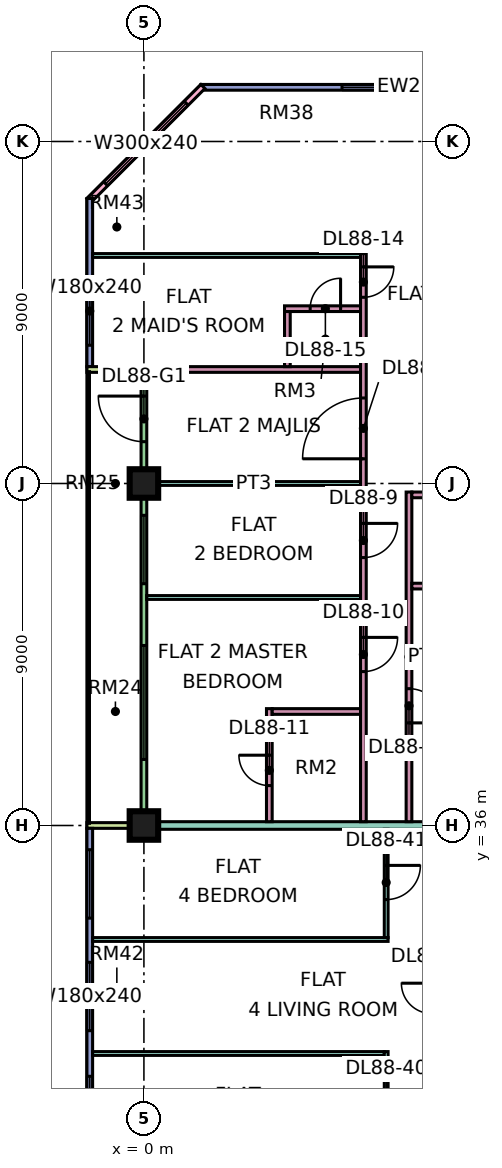
"""IFC4 building model, lengths in metres.
Left out: names, types, materials, properties, quantities, classifications, styles, units other than length and angle.
Written with IfcOpenShell. Run it as: python <this file> out.ifc"""

import sys

from ifc_helpers import new_model, si_unit, direction, frame, frame_2d, origin, origin_2d, place, context, subcontext, project, spatial, rectangle, extrude, element, fill, save


model = new_model("IFC4")
c1 = context("Model", 3, precision=1e-05, world=origin(), true_north=direction((0.0, 1.0)))
c2 = subcontext(c1, "Body", "Model", "MODEL_VIEW")
j1 = project(units=[si_unit("LENGTHUNIT", "METRE"), si_unit("PLANEANGLEUNIT", "RADIAN")], contexts=[c1])
p1 = place(None, origin())
s1 = spatial("IfcSite", under=j1, at=p1, CompositionType="ELEMENT")
p2 = place(p1, origin())
s2 = spatial("IfcBuilding", under=s1, at=p2, CompositionType="ELEMENT")
p3 = place(p2, frame((0.0, 0.0, 376.4)))
s3 = spatial("IfcBuildingStorey", under=s2, at=p3, CompositionType="ELEMENT", Elevation=376.4)
p4 = place(p3, frame((0.0, 36.0, 0.0), z_axis=(0.0, 0.0, 1.0), x_axis=(1.0, 0.0, 0.0)))
e1 = element("IfcColumn", 1, at=p4, inside=s3, PredefinedType="COLUMN", context=c2, shape_type="SweptSolid", body=[
    extrude(rectangle(XDim=0.75, YDim=0.75, at=origin_2d()), origin(), (0.0, 0.0, 1.0), 3.75),
])
p5 = place(p3, frame((0.0, 45.0, 0.0), z_axis=(0.0, 0.0, 1.0), x_axis=(1.0, 0.0, 0.0)))
e2 = element("IfcColumn", 2, at=p5, inside=s3, PredefinedType="COLUMN", context=c2, shape_type="SweptSolid", body=[
    extrude(rectangle(XDim=0.75, YDim=0.75, at=origin_2d()), origin(), (0.0, 0.0, 1.0), 3.75),
])
p6 = place(p3, frame((11.925, 55.425, 0.0), z_axis=(0.0, 0.0, 1.0), x_axis=(-1.0, 0.0, 0.0)))
e3 = element("IfcWall", 3, at=p6, inside=s3, PredefinedType="SOLIDWALL", context=c2, shape_type="SweptSolid", body=[
    extrude(rectangle(XDim=10.425, YDim=0.15, at=frame_2d((5.212, 0.0))), origin(), (0.0, 0.0, 1.0), 3.35),
])
p7 = place(p6, frame((3.712, 0.0, 0.45)))
e4 = element("IfcOpeningElement", 4, at=p7, cuts=e3, PredefinedType="OPENING", context=c2, shape_type="SweptSolid", body=[
    extrude(rectangle(XDim=3.0, YDim=2.4, at=frame_2d((1.5, 1.2))), frame((0.0, 0.085, 0.0), z_axis=(0.0, -1.0, 0.0), x_axis=(1.0, 0.0, 0.0)), (0.0, 0.0, 1.0), 0.17),
])
p8 = place(p3, frame((1.553, 55.447, 0.0), z_axis=(0.0, 0.0, 1.0), x_axis=(-0.707106781187, -0.707106781187, 0.0)))
e5 = element("IfcWall", 5, at=p8, inside=s3, PredefinedType="SOLIDWALL", context=c2, shape_type="SweptSolid", body=[
    extrude(rectangle(XDim=4.243, YDim=0.15, at=frame_2d((2.121, 0.0))), origin(), (0.0, 0.0, 1.0), 3.35),
])
p9 = place(p8, frame((0.621, 0.0, 0.45)))
e6 = element("IfcOpeningElement", 6, at=p9, cuts=e5, PredefinedType="OPENING", context=c2, shape_type="SweptSolid", body=[
    extrude(rectangle(XDim=3.0, YDim=2.4, at=frame_2d((1.5, 1.2))), frame((0.0, 0.085, 0.0), z_axis=(0.0, -1.0, 0.0), x_axis=(1.0, 0.0, 0.0)), (0.0, 0.0, 1.0), 0.17),
])
p10 = place(p3, frame((-1.425, 52.5, 0.0), z_axis=(0.0, 0.0, 1.0), x_axis=(0.0, -1.0, 0.0)))
e7 = element("IfcWall", 7, at=p10, inside=s3, PredefinedType="SOLIDWALL", context=c2, shape_type="SweptSolid", body=[
    extrude(rectangle(XDim=4.425, YDim=0.15, at=frame_2d((2.212, 0.0))), origin(), (0.0, 0.0, 1.0), 3.35),
])
p11 = place(p10, frame((2.062, 0.0, 0.45)))
e8 = element("IfcOpeningElement", 8, at=p11, cuts=e7, PredefinedType="OPENING", context=c2, shape_type="SweptSolid", body=[
    extrude(rectangle(XDim=1.8, YDim=2.4, at=frame_2d((0.9, 1.2))), frame((0.0, 0.085, 0.0), z_axis=(0.0, -1.0, 0.0), x_axis=(1.0, 0.0, 0.0)), (0.0, 0.0, 1.0), 0.17),
])
p12 = place(p3, frame((0.0, 47.925, 0.0), z_axis=(0.0, 0.0, 1.0), x_axis=(0.0, -1.0, 0.0)))
e9 = element("IfcWall", 9, at=p12, inside=s3, PredefinedType="SOLIDWALL", context=c2, shape_type="SweptSolid", body=[
    extrude(rectangle(XDim=11.85, YDim=0.15, at=frame_2d((5.925, 0.0))), origin(), (0.0, 0.0, 1.0), 3.35),
])
p13 = place(p12, frame((0.625, 0.0, 0.0)))
e10 = element("IfcOpeningElement", 10, at=p13, cuts=e9, PredefinedType="OPENING", context=c2, shape_type="SweptSolid", body=[
    extrude(rectangle(XDim=1.2, YDim=2.4, at=frame_2d((0.6, 1.2))), frame((0.0, 0.085, 0.0), z_axis=(0.0, -1.0, 0.0), x_axis=(1.0, 0.0, 0.0)), (0.0, 0.0, 1.0), 0.17),
])
p14 = place(p12, frame((3.762, 0.0, 0.45)))
e11 = element("IfcOpeningElement", 11, at=p14, cuts=e9, PredefinedType="OPENING", context=c2, shape_type="SweptSolid", body=[
    extrude(rectangle(XDim=1.8, YDim=2.4, at=frame_2d((0.9, 1.2))), frame((0.0, 0.085, 0.0), z_axis=(0.0, -1.0, 0.0), x_axis=(1.0, 0.0, 0.0)), (0.0, 0.0, 1.0), 0.17),
])
p15 = place(p12, frame((7.188, 0.0, 0.45)))
e12 = element("IfcOpeningElement", 12, at=p15, cuts=e9, PredefinedType="OPENING", context=c2, shape_type="SweptSolid", body=[
    extrude(rectangle(XDim=3.0, YDim=2.4, at=frame_2d((1.5, 1.2))), frame((0.0, 0.085, 0.0), z_axis=(0.0, -1.0, 0.0), x_axis=(1.0, 0.0, 0.0)), (0.0, 0.0, 1.0), 0.17),
])
for number, where, z_axis, x_axis in (
    (13, (-1.5, 48.0, 0.0), (0.0, 0.0, 1.0), (1.0, 0.0, 0.0)),
    (14, (-1.5, 36.0, 0.0), (0.0, 0.0, 1.0), (1.0, 0.0, 0.0)),
):
    element("IfcWall", number, at=place(p3, frame(where, z_axis=z_axis, x_axis=x_axis)), inside=s3, PredefinedType="SOLIDWALL", context=c2, shape_type="SweptSolid", body=[
        extrude(rectangle(XDim=1.5, YDim=0.15, at=frame_2d((0.75, 0.0))), origin(), (0.0, 0.0, 1.0), 3.35),
    ])
p16 = place(p3, frame((-1.425, 35.925, 0.0), z_axis=(0.0, 0.0, 1.0), x_axis=(0.0, -1.0, 0.0)))
e15 = element("IfcWall", 15, at=p16, inside=s3, PredefinedType="SOLIDWALL", context=c2, shape_type="SweptSolid", body=[
    extrude(rectangle(XDim=11.85, YDim=0.15, at=frame_2d((5.925, 0.0))), origin(), (0.0, 0.0, 1.0), 3.35),
])
p17 = place(p16, frame((0.562, 0.0, 0.45)))
e16 = element("IfcOpeningElement", 16, at=p17, cuts=e15, PredefinedType="OPENING", context=c2, shape_type="SweptSolid", body=[
    extrude(rectangle(XDim=1.8, YDim=2.4, at=frame_2d((0.9, 1.2))), frame((0.0, 0.085, 0.0), z_axis=(0.0, -1.0, 0.0), x_axis=(1.0, 0.0, 0.0)), (0.0, 0.0, 1.0), 0.17),
])
p18 = place(p16, frame((3.525, 0.0, 0.45)))
e17 = element("IfcOpeningElement", 17, at=p18, cuts=e15, PredefinedType="OPENING", context=c2, shape_type="SweptSolid", body=[
    extrude(rectangle(XDim=1.8, YDim=2.4, at=frame_2d((0.9, 1.2))), frame((0.0, 0.085, 0.0), z_axis=(0.0, -1.0, 0.0), x_axis=(1.0, 0.0, 0.0)), (0.0, 0.0, 1.0), 0.17),
])
p19 = place(p16, frame((6.525, 0.0, 0.45)))
e18 = element("IfcOpeningElement", 18, at=p19, cuts=e15, PredefinedType="OPENING", context=c2, shape_type="SweptSolid", body=[
    extrude(rectangle(XDim=1.8, YDim=2.4, at=frame_2d((0.9, 1.2))), frame((0.0, 0.085, 0.0), z_axis=(0.0, -1.0, 0.0), x_axis=(1.0, 0.0, 0.0)), (0.0, 0.0, 1.0), 0.17),
])
p20 = place(p16, frame((9.488, 0.0, 0.45)))
e19 = element("IfcOpeningElement", 19, at=p20, cuts=e15, PredefinedType="OPENING", context=c2, shape_type="SweptSolid", body=[
    extrude(rectangle(XDim=1.8, YDim=2.4, at=frame_2d((0.9, 1.2))), frame((0.0, 0.085, 0.0), z_axis=(0.0, -1.0, 0.0), x_axis=(1.0, 0.0, 0.0)), (0.0, 0.0, 1.0), 0.17),
])
p21 = place(p3, frame((-1.35, 30.0, 0.0), z_axis=(0.0, 0.0, 1.0), x_axis=(1.0, 0.0, 0.0)))
e20 = element("IfcWall", 20, at=p21, inside=s3, PredefinedType="PARTITIONING", context=c2, shape_type="SweptSolid", body=[
    extrude(rectangle(XDim=7.675, YDim=0.1, at=frame_2d((3.837, 0.0))), origin(), (0.0, 0.0, 1.0), 3.35),
])
p22 = place(p3, frame((-1.35, 33.0, 0.0), z_axis=(0.0, 0.0, 1.0), x_axis=(1.0, 0.0, 0.0)))
e21 = element("IfcWall", 21, at=p22, inside=s3, PredefinedType="PARTITIONING", context=c2, shape_type="SweptSolid", body=[
    extrude(rectangle(XDim=7.775, YDim=0.1, at=frame_2d((3.888, 0.0))), origin(), (0.0, 0.0, 1.0), 3.35),
])
e22 = element("IfcWall", 22, at=p4, inside=s3, PredefinedType="PARTITIONING", context=c2, shape_type="SweptSolid", body=[
    extrude(rectangle(XDim=12.275, YDim=0.2, at=frame_2d((6.137, 0.0))), origin(), (0.0, 0.0, 1.0), 3.35),
])
p23 = place(p3, frame((0.0, 48.0, 0.0), z_axis=(0.0, 0.0, 1.0), x_axis=(1.0, 0.0, 0.0)))
e23 = element("IfcWall", 23, at=p23, inside=s3, PredefinedType="PARTITIONING", context=c2, shape_type="SweptSolid", body=[
    extrude(rectangle(XDim=5.7, YDim=0.15, at=frame_2d((2.85, 0.0))), origin(), (0.0, 0.0, 1.0), 3.35),
])
p24 = place(p3, frame((-1.35, 51.0, 0.0), z_axis=(0.0, 0.0, 1.0), x_axis=(1.0, 0.0, 0.0)))
e24 = element("IfcWall", 24, at=p24, inside=s3, PredefinedType="PARTITIONING", context=c2, shape_type="SweptSolid", body=[
    extrude(rectangle(XDim=7.05, YDim=0.1, at=frame_2d((3.525, 0.0))), origin(), (0.0, 0.0, 1.0), 3.35),
])
for number, where, z_axis, x_axis in (
    (25, (0.074, 42.0, 0.0), (0.0, 0.0, 1.0), (1.0, 0.0, 0.0)),
    (26, (0.074, 45.0, 0.0), (0.0, 0.0, 1.0), (1.0, 0.0, 0.0)),
):
    element("IfcWall", number, at=place(p3, frame(where, z_axis=z_axis, x_axis=x_axis)), inside=s3, PredefinedType="PARTITIONING", context=c2, shape_type="SweptSolid", body=[
        extrude(rectangle(XDim=5.626, YDim=0.1, at=frame_2d((2.813, 0.0))), origin(), (0.0, 0.0, 1.0), 3.35),
    ])
p25 = place(p3, frame((3.3, 36.1, 0.0), z_axis=(0.0, 0.0, 1.0), x_axis=(0.0, 1.0, 0.0)))
e27 = element("IfcWall", 27, at=p25, inside=s3, PredefinedType="PARTITIONING", context=c2, shape_type="SweptSolid", body=[
    extrude(rectangle(XDim=2.975, YDim=0.15, at=frame_2d((1.487, 0.0))), origin(), (0.0, 0.0, 1.0), 3.35),
])
p26 = place(p25, frame((0.95, 0.0, 0.0)))
e28 = element("IfcOpeningElement", 28, at=p26, cuts=e27, PredefinedType="OPENING", context=c2, shape_type="SweptSolid", body=[
    extrude(rectangle(XDim=0.8, YDim=2.1, at=frame_2d((0.4, 1.05))), frame((0.0, 0.085, 0.0), z_axis=(0.0, -1.0, 0.0), x_axis=(1.0, 0.0, 0.0)), (0.0, 0.0, 1.0), 0.17),
])
p27 = place(p3, frame((3.375, 39.0, 0.0), z_axis=(0.0, 0.0, 1.0), x_axis=(1.0, 0.0, 0.0)))
e29 = element("IfcWall", 29, at=p27, inside=s3, PredefinedType="PARTITIONING", context=c2, shape_type="SweptSolid", body=[
    extrude(rectangle(XDim=2.325, YDim=0.15, at=frame_2d((1.163, 0.0))), origin(), (0.0, 0.0, 1.0), 3.35),
])
p28 = place(p3, frame((3.7, 49.6, 0.0), z_axis=(0.0, 0.0, 1.0), x_axis=(1.0, 0.0, 0.0)))
e30 = element("IfcWall", 30, at=p28, inside=s3, PredefinedType="PARTITIONING", context=c2, shape_type="SweptSolid", body=[
    extrude(rectangle(XDim=2.0, YDim=0.15, at=frame_2d((1.0, 0.0))), origin(), (0.0, 0.0, 1.0), 3.35),
])
p29 = place(p28, frame((0.675, 0.0, 0.0)))
e31 = element("IfcOpeningElement", 31, at=p29, cuts=e30, PredefinedType="OPENING", context=c2, shape_type="SweptSolid", body=[
    extrude(rectangle(XDim=0.8, YDim=2.1, at=frame_2d((0.4, 1.05))), frame((0.0, 0.085, 0.0), z_axis=(0.0, -1.0, 0.0), x_axis=(1.0, 0.0, 0.0)), (0.0, 0.0, 1.0), 0.17),
])
p30 = place(p3, frame((3.775, 48.075, 0.0), z_axis=(0.0, 0.0, 1.0), x_axis=(0.0, 1.0, 0.0)))
e32 = element("IfcWall", 32, at=p30, inside=s3, PredefinedType="PARTITIONING", context=c2, shape_type="SweptSolid", body=[
    extrude(rectangle(XDim=1.45, YDim=0.15, at=frame_2d((0.725, 0.0))), origin(), (0.0, 0.0, 1.0), 3.35),
])
p31 = place(p3, frame((5.775, 36.1, 0.0), z_axis=(0.0, 0.0, 1.0), x_axis=(0.0, 1.0, 0.0)))
e33 = element("IfcWall", 33, at=p31, inside=s3, PredefinedType="PARTITIONING", context=c2, shape_type="SweptSolid", body=[
    extrude(rectangle(XDim=14.95, YDim=0.15, at=frame_2d((7.475, 0.0))), origin(), (0.0, 0.0, 1.0), 3.35),
])
p32 = place(p31, frame((6.95, 0.0, 0.0)))
e34 = element("IfcOpeningElement", 34, at=p32, cuts=e33, PredefinedType="OPENING", context=c2, shape_type="SweptSolid", body=[
    extrude(rectangle(XDim=0.9, YDim=2.1, at=frame_2d((0.45, 1.05))), frame((0.0, 0.085, 0.0), z_axis=(0.0, -1.0, 0.0), x_axis=(1.0, 0.0, 0.0)), (0.0, 0.0, 1.0), 0.17),
])
p33 = place(p31, frame((3.95, 0.0, 0.0)))
e35 = element("IfcOpeningElement", 35, at=p33, cuts=e33, PredefinedType="OPENING", context=c2, shape_type="SweptSolid", body=[
    extrude(rectangle(XDim=0.9, YDim=2.1, at=frame_2d((0.45, 1.05))), frame((0.0, 0.085, 0.0), z_axis=(0.0, -1.0, 0.0), x_axis=(1.0, 0.0, 0.0)), (0.0, 0.0, 1.0), 0.17),
])
p34 = place(p31, frame((13.8, 0.0, 0.0)))
e36 = element("IfcOpeningElement", 36, at=p34, cuts=e33, PredefinedType="OPENING", context=c2, shape_type="SweptSolid", body=[
    extrude(rectangle(XDim=0.8, YDim=2.1, at=frame_2d((0.4, 1.05))), frame((0.0, 0.085, 0.0), z_axis=(0.0, -1.0, 0.0), x_axis=(1.0, 0.0, 0.0)), (0.0, 0.0, 1.0), 0.17),
])
p35 = place(p31, frame((9.55, 0.0, 0.0)))
e37 = element("IfcOpeningElement", 37, at=p35, cuts=e33, PredefinedType="OPENING", context=c2, shape_type="SweptSolid", body=[
    extrude(rectangle(XDim=1.6, YDim=2.1, at=frame_2d((0.8, 1.05))), frame((0.0, 0.085, 0.0), z_axis=(0.0, -1.0, 0.0), x_axis=(1.0, 0.0, 0.0)), (0.0, 0.0, 1.0), 0.17),
])
p36 = place(p3, frame((6.375, 22.5, 0.0), z_axis=(0.0, 0.0, 1.0), x_axis=(0.0, 1.0, 0.0)))
e38 = element("IfcWall", 38, at=p36, inside=s3, PredefinedType="PARTITIONING", context=c2, shape_type="SweptSolid", body=[
    extrude(rectangle(XDim=7.55, YDim=0.1, at=frame_2d((3.775, 0.0))), origin(), (0.0, 0.0, 1.0), 3.35),
])
p37 = place(p36, frame((1.8, 0.0, 0.0)))
e39 = element("IfcOpeningElement", 39, at=p37, cuts=e38, PredefinedType="OPENING", context=c2, shape_type="SweptSolid", body=[
    extrude(rectangle(XDim=0.9, YDim=2.1, at=frame_2d((0.45, 1.05))), frame((0.0, 0.06, 0.0), z_axis=(0.0, -1.0, 0.0), x_axis=(1.0, 0.0, 0.0)), (0.0, 0.0, 1.0), 0.12),
])
p38 = place(p36, frame((5.55, 0.0, 0.0)))
e40 = element("IfcOpeningElement", 40, at=p38, cuts=e38, PredefinedType="OPENING", context=c2, shape_type="SweptSolid", body=[
    extrude(rectangle(XDim=0.9, YDim=2.1, at=frame_2d((0.45, 1.05))), frame((0.0, 0.06, 0.0), z_axis=(0.0, -1.0, 0.0), x_axis=(1.0, 0.0, 0.0)), (0.0, 0.0, 1.0), 0.12),
])
p39 = place(p3, frame((6.375, 33.05, 0.0), z_axis=(0.0, 0.0, 1.0), x_axis=(0.0, 1.0, 0.0)))
e41 = element("IfcWall", 41, at=p39, inside=s3, PredefinedType="PARTITIONING", context=c2, shape_type="SweptSolid", body=[
    extrude(rectangle(XDim=2.85, YDim=0.1, at=frame_2d((1.425, 0.0))), origin(), (0.0, 0.0, 1.0), 3.35),
])
p40 = place(p39, frame((1.0, 0.0, 0.0)))
e42 = element("IfcOpeningElement", 42, at=p40, cuts=e41, PredefinedType="OPENING", context=c2, shape_type="SweptSolid", body=[
    extrude(rectangle(XDim=0.9, YDim=2.1, at=frame_2d((0.45, 1.05))), frame((0.0, 0.06, 0.0), z_axis=(0.0, -1.0, 0.0), x_axis=(1.0, 0.0, 0.0)), (0.0, 0.0, 1.0), 0.12),
])
p41 = place(p3, frame((6.975, 36.1, 0.0), z_axis=(0.0, 0.0, 1.0), x_axis=(0.0, 1.0, 0.0)))
e43 = element("IfcWall", 43, at=p41, inside=s3, PredefinedType="PARTITIONING", context=c2, shape_type="SweptSolid", body=[
    extrude(rectangle(XDim=8.675, YDim=0.15, at=frame_2d((4.337, 0.0))), origin(), (0.0, 0.0, 1.0), 3.35),
])
p42 = place(p41, frame((2.6, 0.0, 0.0)))
e44 = element("IfcOpeningElement", 44, at=p42, cuts=e43, PredefinedType="OPENING", context=c2, shape_type="SweptSolid", body=[
    extrude(rectangle(XDim=0.9, YDim=2.1, at=frame_2d((0.45, 1.05))), frame((0.0, 0.085, 0.0), z_axis=(0.0, -1.0, 0.0), x_axis=(1.0, 0.0, 0.0)), (0.0, 0.0, 1.0), 0.17),
])
p43 = place(p3, frame((7.05, 42.3, 0.0), z_axis=(0.0, 0.0, 1.0), x_axis=(1.0, 0.0, 0.0)))
e45 = element("IfcWall", 45, at=p43, inside=s3, PredefinedType="PARTITIONING", context=c2, shape_type="SweptSolid", body=[
    extrude(rectangle(XDim=5.225, YDim=0.15, at=frame_2d((2.612, 0.0))), origin(), (0.0, 0.0, 1.0), 3.35),
])
p44 = place(p3, frame((7.05, 44.7, 0.0), z_axis=(0.0, 0.0, 1.0), x_axis=(1.0, 0.0, 0.0)))
e46 = element("IfcWall", 46, at=p44, inside=s3, PredefinedType="PARTITIONING", context=c2, shape_type="SweptSolid", body=[
    extrude(rectangle(XDim=5.225, YDim=0.15, at=frame_2d((2.612, 0.0))), origin(), (0.0, 0.0, 1.0), 3.35),
])
p45 = place(p44, frame((2.175, 0.0, 0.0)))
e47 = element("IfcOpeningElement", 47, at=p45, cuts=e46, PredefinedType="OPENING", context=c2, shape_type="SweptSolid", body=[
    extrude(rectangle(XDim=0.8, YDim=2.1, at=frame_2d((0.4, 1.05))), frame((0.0, 0.085, 0.0), z_axis=(0.0, -1.0, 0.0), x_axis=(1.0, 0.0, 0.0)), (0.0, 0.0, 1.0), 0.17),
])
p46 = place(p7, origin())
e48 = element("IfcWindow", 48, at=p46, inside=s3, PartitioningType="SINGLE_PANEL", PredefinedType="WINDOW", context=c2, shape_type="SweptSolid", body=[
    extrude(rectangle(XDim=3.0, YDim=2.4, at=frame_2d((1.5, 1.2))), frame((0.0, 0.03, 0.0), z_axis=(0.0, -1.0, 0.0), x_axis=(1.0, 0.0, 0.0)), (0.0, 0.0, 1.0), 0.06),
])
fill(e4, e48)
p47 = place(p9, origin())
e49 = element("IfcWindow", 49, at=p47, inside=s3, PartitioningType="SINGLE_PANEL", PredefinedType="WINDOW", context=c2, shape_type="SweptSolid", body=[
    extrude(rectangle(XDim=3.0, YDim=2.4, at=frame_2d((1.5, 1.2))), frame((0.0, 0.03, 0.0), z_axis=(0.0, -1.0, 0.0), x_axis=(1.0, 0.0, 0.0)), (0.0, 0.0, 1.0), 0.06),
])
fill(e6, e49)
p48 = place(p11, origin())
e50 = element("IfcWindow", 50, at=p48, inside=s3, PartitioningType="SINGLE_PANEL", PredefinedType="WINDOW", context=c2, shape_type="SweptSolid", body=[
    extrude(rectangle(XDim=1.8, YDim=2.4, at=frame_2d((0.9, 1.2))), frame((0.0, 0.03, 0.0), z_axis=(0.0, -1.0, 0.0), x_axis=(1.0, 0.0, 0.0)), (0.0, 0.0, 1.0), 0.06),
])
fill(e8, e50)
p49 = place(p13, frame((1.2, 0.0, 0.0), z_axis=(0.0, 0.0, 1.0), x_axis=(-1.0, 0.0, 0.0)))
e51 = element("IfcDoor", 51, at=p49, inside=s3, OperationType="DOUBLE_DOOR_SINGLE_SWING", PredefinedType="DOOR", context=c2, shape_type="SweptSolid", body=[
    extrude(rectangle(XDim=1.2, YDim=2.4, at=frame_2d((0.6, 1.2))), frame((0.0, 0.025, 0.0), z_axis=(0.0, -1.0, 0.0), x_axis=(1.0, 0.0, 0.0)), (0.0, 0.0, 1.0), 0.05),
])
fill(e10, e51)
p50 = place(p14, origin())
e52 = element("IfcWindow", 52, at=p50, inside=s3, PartitioningType="SINGLE_PANEL", PredefinedType="WINDOW", context=c2, shape_type="SweptSolid", body=[
    extrude(rectangle(XDim=1.8, YDim=2.4, at=frame_2d((0.9, 1.2))), frame((0.0, 0.03, 0.0), z_axis=(0.0, -1.0, 0.0), x_axis=(1.0, 0.0, 0.0)), (0.0, 0.0, 1.0), 0.06),
])
fill(e11, e52)
p51 = place(p15, origin())
e53 = element("IfcWindow", 53, at=p51, inside=s3, PartitioningType="SINGLE_PANEL", PredefinedType="WINDOW", context=c2, shape_type="SweptSolid", body=[
    extrude(rectangle(XDim=3.0, YDim=2.4, at=frame_2d((1.5, 1.2))), frame((0.0, 0.03, 0.0), z_axis=(0.0, -1.0, 0.0), x_axis=(1.0, 0.0, 0.0)), (0.0, 0.0, 1.0), 0.06),
])
fill(e12, e53)
p52 = place(p17, origin())
e54 = element("IfcWindow", 54, at=p52, inside=s3, PartitioningType="SINGLE_PANEL", PredefinedType="WINDOW", context=c2, shape_type="SweptSolid", body=[
    extrude(rectangle(XDim=1.8, YDim=2.4, at=frame_2d((0.9, 1.2))), frame((0.0, 0.03, 0.0), z_axis=(0.0, -1.0, 0.0), x_axis=(1.0, 0.0, 0.0)), (0.0, 0.0, 1.0), 0.06),
])
fill(e16, e54)
p53 = place(p18, origin())
e55 = element("IfcWindow", 55, at=p53, inside=s3, PartitioningType="SINGLE_PANEL", PredefinedType="WINDOW", context=c2, shape_type="SweptSolid", body=[
    extrude(rectangle(XDim=1.8, YDim=2.4, at=frame_2d((0.9, 1.2))), frame((0.0, 0.03, 0.0), z_axis=(0.0, -1.0, 0.0), x_axis=(1.0, 0.0, 0.0)), (0.0, 0.0, 1.0), 0.06),
])
fill(e17, e55)
p54 = place(p19, origin())
e56 = element("IfcWindow", 56, at=p54, inside=s3, PartitioningType="SINGLE_PANEL", PredefinedType="WINDOW", context=c2, shape_type="SweptSolid", body=[
    extrude(rectangle(XDim=1.8, YDim=2.4, at=frame_2d((0.9, 1.2))), frame((0.0, 0.03, 0.0), z_axis=(0.0, -1.0, 0.0), x_axis=(1.0, 0.0, 0.0)), (0.0, 0.0, 1.0), 0.06),
])
fill(e18, e56)
p55 = place(p32, origin())
e57 = element("IfcDoor", 57, at=p55, inside=s3, OperationType="SINGLE_SWING_RIGHT", PredefinedType="DOOR", context=c2, shape_type="SweptSolid", body=[
    extrude(rectangle(XDim=0.9, YDim=2.1, at=frame_2d((0.45, 1.05))), frame((0.0, 0.025, 0.0), z_axis=(0.0, -1.0, 0.0), x_axis=(1.0, 0.0, 0.0)), (0.0, 0.0, 1.0), 0.05),
])
fill(e34, e57)
p56 = place(p33, origin())
e58 = element("IfcDoor", 58, at=p56, inside=s3, OperationType="SINGLE_SWING_RIGHT", PredefinedType="DOOR", context=c2, shape_type="SweptSolid", body=[
    extrude(rectangle(XDim=0.9, YDim=2.1, at=frame_2d((0.45, 1.05))), frame((0.0, 0.025, 0.0), z_axis=(0.0, -1.0, 0.0), x_axis=(1.0, 0.0, 0.0)), (0.0, 0.0, 1.0), 0.05),
])
fill(e35, e58)
p57 = place(p26, frame((0.8, 0.0, 0.0), z_axis=(0.0, 0.0, 1.0), x_axis=(-1.0, 0.0, 0.0)))
e59 = element("IfcDoor", 59, at=p57, inside=s3, OperationType="SINGLE_SWING_RIGHT", PredefinedType="DOOR", context=c2, shape_type="SweptSolid", body=[
    extrude(rectangle(XDim=0.8, YDim=2.1, at=frame_2d((0.4, 1.05))), frame((0.0, 0.025, 0.0), z_axis=(0.0, -1.0, 0.0), x_axis=(1.0, 0.0, 0.0)), (0.0, 0.0, 1.0), 0.05),
])
fill(e28, e59)
p58 = place(p42, frame((0.9, 0.0, 0.0), z_axis=(0.0, 0.0, 1.0), x_axis=(-1.0, 0.0, 0.0)))
e60 = element("IfcDoor", 60, at=p58, inside=s3, OperationType="SINGLE_SWING_LEFT", PredefinedType="DOOR", context=c2, shape_type="SweptSolid", body=[
    extrude(rectangle(XDim=0.9, YDim=2.1, at=frame_2d((0.45, 1.05))), frame((0.0, 0.025, 0.0), z_axis=(0.0, -1.0, 0.0), x_axis=(1.0, 0.0, 0.0)), (0.0, 0.0, 1.0), 0.05),
])
fill(e44, e60)
p59 = place(p34, origin())
e61 = element("IfcDoor", 61, at=p59, inside=s3, OperationType="SINGLE_SWING_RIGHT", PredefinedType="DOOR", context=c2, shape_type="SweptSolid", body=[
    extrude(rectangle(XDim=0.8, YDim=2.1, at=frame_2d((0.4, 1.05))), frame((0.0, 0.025, 0.0), z_axis=(0.0, -1.0, 0.0), x_axis=(1.0, 0.0, 0.0)), (0.0, 0.0, 1.0), 0.05),
])
fill(e36, e61)
p60 = place(p29, frame((0.8, 0.0, 0.0), z_axis=(0.0, 0.0, 1.0), x_axis=(-1.0, 0.0, 0.0)))
e62 = element("IfcDoor", 62, at=p60, inside=s3, OperationType="SINGLE_SWING_RIGHT", PredefinedType="DOOR", context=c2, shape_type="SweptSolid", body=[
    extrude(rectangle(XDim=0.8, YDim=2.1, at=frame_2d((0.4, 1.05))), frame((0.0, 0.025, 0.0), z_axis=(0.0, -1.0, 0.0), x_axis=(1.0, 0.0, 0.0)), (0.0, 0.0, 1.0), 0.05),
])
fill(e31, e62)
p61 = place(p35, origin())
e63 = element("IfcDoor", 63, at=p61, inside=s3, OperationType="DOUBLE_DOOR_SINGLE_SWING", PredefinedType="DOOR", context=c2, shape_type="SweptSolid", body=[
    extrude(rectangle(XDim=1.6, YDim=2.1, at=frame_2d((0.8, 1.05))), frame((0.0, 0.025, 0.0), z_axis=(0.0, -1.0, 0.0), x_axis=(1.0, 0.0, 0.0)), (0.0, 0.0, 1.0), 0.05),
])
fill(e37, e63)
p62 = place(p40, origin())
e64 = element("IfcDoor", 64, at=p62, inside=s3, OperationType="SINGLE_SWING_RIGHT", PredefinedType="DOOR", context=c2, shape_type="SweptSolid", body=[
    extrude(rectangle(XDim=0.9, YDim=2.1, at=frame_2d((0.45, 1.05))), frame((0.0, 0.025, 0.0), z_axis=(0.0, -1.0, 0.0), x_axis=(1.0, 0.0, 0.0)), (0.0, 0.0, 1.0), 0.05),
])
fill(e42, e64)
save(model, sys.argv[1])
